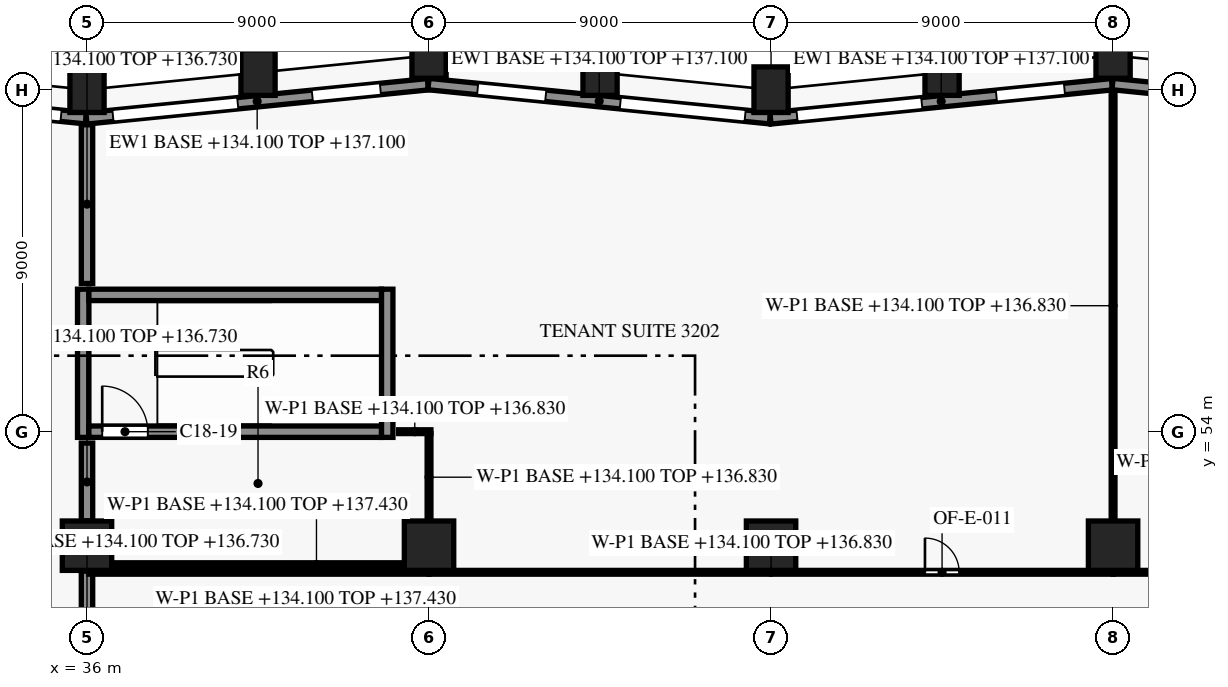
"""IFC4 building model, lengths in metres.
Left out: names, types, materials, properties, quantities, classifications, styles, units other than length and angle.
Written with IfcOpenShell. Run it as: python <this file> out.ifc"""

import sys

from ifc_helpers import new_model, si_unit, direction, frame, frame_2d, origin, origin_2d, place, context, subcontext, project, spatial, rectangle, extrude, element, fill, save


model = new_model("IFC4")
c1 = context("Model", 3, precision=1e-05, world=origin(), true_north=direction((0.0, 1.0)))
c2 = subcontext(c1, "Body", "Model", "MODEL_VIEW")
j1 = project(units=[si_unit("LENGTHUNIT", "METRE"), si_unit("PLANEANGLEUNIT", "RADIAN")], contexts=[c1])
p1 = place(None, origin())
s1 = spatial("IfcSite", under=j1, at=p1, CompositionType="ELEMENT")
p2 = place(p1, origin())
s2 = spatial("IfcBuilding", under=s1, at=p2, CompositionType="ELEMENT")
p3 = place(p2, frame((0.0, 0.0, 134.1)))
s3 = spatial("IfcBuildingStorey", under=s2, at=p3, CompositionType="ELEMENT", Elevation=134.1)
for number, where, z_axis, x_axis in (
    (1, (63.0, 63.9, 0.0), (0.0, 0.0, 1.0), (-1.0, 0.0, 0.0)),
    (2, (58.5, 63.45, 0.0), (0.0, 0.0, 1.0), (-0.995, -0.1, 0.0)),
    (3, (54.0, 63.0, 0.0), (0.0, 0.0, 1.0), (-1.0, 0.0, 0.0)),
    (4, (49.5, 63.45, 0.0), (0.0, 0.0, 1.0), (-0.995, 0.1, 0.0)),
    (5, (45.0, 63.9, 0.0), (0.0, 0.0, 1.0), (-1.0, 0.0, 0.0)),
    (6, (40.5, 63.45, 0.0), (0.0, 0.0, 1.0), (-0.995, -0.1, 0.0)),
    (7, (36.0, 63.0, 0.0), (0.0, 0.0, 1.0), (-1.0, 0.0, 0.0)),
):
    element("IfcColumn", number, at=place(p3, frame(where, z_axis=z_axis, x_axis=x_axis)), inside=s3, PredefinedType="COLUMN", context=c2, shape_type="SweptSolid", body=[
        extrude(rectangle(XDim=0.9, YDim=1.2, at=origin_2d()), origin(), (0.0, 0.0, 1.0), 3.8),
    ])
for number, where, z_axis, x_axis in (
    (8, (36.0, 51.0, 0.0), (0.0, 0.0, 1.0), (1.0, 0.0, 0.0)),
    (9, (45.0, 51.0, 0.0), (0.0, 0.0, 1.0), (1.0, 0.0, 0.0)),
    (10, (54.0, 51.0, 0.0), (0.0, 0.0, 1.0), (1.0, 0.0, 0.0)),
    (11, (63.0, 51.0, 0.0), (0.0, 0.0, 1.0), (1.0, 0.0, 0.0)),
):
    element("IfcColumn", number, at=place(p3, frame(where, z_axis=z_axis, x_axis=x_axis)), inside=s3, PredefinedType="COLUMN", context=c2, shape_type="SweptSolid", body=[
        extrude(rectangle(XDim=1.3, YDim=1.3, at=origin_2d()), origin(), (0.0, 0.0, 1.0), 3.8),
    ])
p4 = place(p3, frame((62.985, 63.148, 0.0), z_axis=(0.0, 0.0, 1.0), x_axis=(0.995038521274, -0.099490407478, 0.0)))
e12 = element("IfcWall", 12, at=p4, inside=s3, PredefinedType="SOLIDWALL", context=c2, shape_type="SweptSolid", body=[
    extrude(rectangle(XDim=3.632, YDim=0.3, at=frame_2d((1.816, 0.0))), origin(), (0.0, 0.0, 1.0), 3.0),
])
p5 = place(p4, frame((1.301, 0.0, 0.75)))
e13 = element("IfcOpeningElement", 13, at=p5, cuts=e12, PredefinedType="OPENING", context=c2, shape_type="SweptSolid", body=[
    extrude(rectangle(XDim=1.8, YDim=1.8, at=frame_2d((0.9, 0.9))), frame((0.0, 0.16, 0.0), z_axis=(0.0, -1.0, 0.0), x_axis=(1.0, 0.0, 0.0)), (0.0, 0.0, 1.0), 0.32),
])
p6 = place(p3, frame((53.985, 62.245, 0.0), z_axis=(0.0, 0.0, 1.0), x_axis=(0.995037993253, 0.099495688264, 0.0)))
e14 = element("IfcWall", 14, at=p6, inside=s3, PredefinedType="SOLIDWALL", context=c2, shape_type="SweptSolid", body=[
    extrude(rectangle(XDim=9.03, YDim=0.3, at=frame_2d((4.515, 0.0))), origin(), (0.0, 0.0, 1.0), 3.0),
])
p7 = place(p6, frame((0.701, 0.0, 0.15)))
e15 = element("IfcOpeningElement", 15, at=p7, cuts=e14, PredefinedType="OPENING", context=c2, shape_type="SweptSolid", body=[
    extrude(rectangle(XDim=3.3, YDim=2.4, at=frame_2d((1.65, 1.2))), frame((0.0, 0.16, 0.0), z_axis=(0.0, -1.0, 0.0), x_axis=(1.0, 0.0, 0.0)), (0.0, 0.0, 1.0), 0.32),
])
p8 = place(p6, frame((5.974, 0.0, 0.75)))
e16 = element("IfcOpeningElement", 16, at=p8, cuts=e14, PredefinedType="OPENING", context=c2, shape_type="SweptSolid", body=[
    extrude(rectangle(XDim=1.8, YDim=1.8, at=frame_2d((0.9, 0.9))), frame((0.0, 0.16, 0.0), z_axis=(0.0, -1.0, 0.0), x_axis=(1.0, 0.0, 0.0)), (0.0, 0.0, 1.0), 0.32),
])
p9 = place(p3, frame((44.985, 63.148, 0.0), z_axis=(0.0, 0.0, 1.0), x_axis=(0.995037993253, -0.099495688264, 0.0)))
e17 = element("IfcWall", 17, at=p9, inside=s3, PredefinedType="SOLIDWALL", context=c2, shape_type="SweptSolid", body=[
    extrude(rectangle(XDim=9.03, YDim=0.3, at=frame_2d((4.515, 0.0))), origin(), (0.0, 0.0, 1.0), 3.0),
])
p10 = place(p9, frame((1.301, 0.0, 0.75)))
e18 = element("IfcOpeningElement", 18, at=p10, cuts=e17, PredefinedType="OPENING", context=c2, shape_type="SweptSolid", body=[
    extrude(rectangle(XDim=1.8, YDim=1.8, at=frame_2d((0.9, 0.9))), frame((0.0, 0.16, 0.0), z_axis=(0.0, -1.0, 0.0), x_axis=(1.0, 0.0, 0.0)), (0.0, 0.0, 1.0), 0.32),
])
p11 = place(p9, frame((5.073, 0.0, 0.15)))
e19 = element("IfcOpeningElement", 19, at=p11, cuts=e17, PredefinedType="OPENING", context=c2, shape_type="SweptSolid", body=[
    extrude(rectangle(XDim=3.3, YDim=2.4, at=frame_2d((1.65, 1.2))), frame((0.0, 0.16, 0.0), z_axis=(0.0, -1.0, 0.0), x_axis=(1.0, 0.0, 0.0)), (0.0, 0.0, 1.0), 0.32),
])
p12 = place(p3, frame((35.985, 62.245, 0.0), z_axis=(0.0, 0.0, 1.0), x_axis=(0.995037993253, 0.099495688264, 0.0)))
e20 = element("IfcWall", 20, at=p12, inside=s3, PredefinedType="SOLIDWALL", context=c2, shape_type="SweptSolid", body=[
    extrude(rectangle(XDim=9.03, YDim=0.3, at=frame_2d((4.515, 0.0))), origin(), (0.0, 0.0, 1.0), 3.0),
])
p13 = place(p12, frame((0.701, 0.0, 0.15)))
e21 = element("IfcOpeningElement", 21, at=p13, cuts=e20, PredefinedType="OPENING", context=c2, shape_type="SweptSolid", body=[
    extrude(rectangle(XDim=3.3, YDim=2.4, at=frame_2d((1.65, 1.2))), frame((0.0, 0.16, 0.0), z_axis=(0.0, -1.0, 0.0), x_axis=(1.0, 0.0, 0.0)), (0.0, 0.0, 1.0), 0.32),
])
p14 = place(p12, frame((5.974, 0.0, 0.75)))
e22 = element("IfcOpeningElement", 22, at=p14, cuts=e20, PredefinedType="OPENING", context=c2, shape_type="SweptSolid", body=[
    extrude(rectangle(XDim=1.8, YDim=1.8, at=frame_2d((0.9, 0.9))), frame((0.0, 0.16, 0.0), z_axis=(0.0, -1.0, 0.0), x_axis=(1.0, 0.0, 0.0)), (0.0, 0.0, 1.0), 0.32),
])
p15 = place(p3, frame((27.075, 63.139, 0.0), z_axis=(0.0, 0.0, 1.0), x_axis=(0.995036108601, -0.099514534519, 0.0)))
e23 = element("IfcWall", 23, at=p15, inside=s3, PredefinedType="SOLIDWALL", context=c2, shape_type="SweptSolid", body=[
    extrude(rectangle(XDim=8.94, YDim=0.3, at=frame_2d((4.47, 0.0))), origin(), (0.0, 0.0, 1.0), 3.0),
])
p16 = place(p15, frame((1.211, 0.0, 0.75)))
e24 = element("IfcOpeningElement", 24, at=p16, cuts=e23, PredefinedType="OPENING", context=c2, shape_type="SweptSolid", body=[
    extrude(rectangle(XDim=1.8, YDim=1.8, at=frame_2d((0.9, 0.9))), frame((0.0, 0.16, 0.0), z_axis=(0.0, -1.0, 0.0), x_axis=(1.0, 0.0, 0.0)), (0.0, 0.0, 1.0), 0.32),
])
p17 = place(p15, frame((4.984, 0.0, 0.15)))
e25 = element("IfcOpeningElement", 25, at=p17, cuts=e23, PredefinedType="OPENING", context=c2, shape_type="SweptSolid", body=[
    extrude(rectangle(XDim=3.3, YDim=2.4, at=frame_2d((1.65, 1.2))), frame((0.0, 0.16, 0.0), z_axis=(0.0, -1.0, 0.0), x_axis=(1.0, 0.0, 0.0)), (0.0, 0.0, 1.0), 0.32),
])
p18 = place(p3, frame((36.05, 54.0, 0.0), z_axis=(0.0, 0.0, 1.0), x_axis=(1.0, 0.0, 0.0)))
e26 = element("IfcWall", 26, at=p18, inside=s3, PredefinedType="SHEAR", context=c2, shape_type="SweptSolid", body=[
    extrude(rectangle(XDim=7.7, YDim=0.3, at=frame_2d((3.85, 0.0))), origin(), (0.0, 0.0, 1.0), 3.5),
])
p19 = place(p18, frame((0.35, 0.0, 0.0)))
e27 = element("IfcOpeningElement", 27, at=p19, cuts=e26, PredefinedType="OPENING", context=c2, shape_type="SweptSolid", body=[
    extrude(rectangle(XDim=1.2, YDim=2.2, at=frame_2d((0.6, 1.1))), frame((0.0, 0.16, 0.0), z_axis=(0.0, -1.0, 0.0), x_axis=(1.0, 0.0, 0.0)), (0.0, 0.0, 1.0), 0.32),
])
p20 = place(p3, frame((36.05, 57.6, 0.0), z_axis=(0.0, 0.0, 1.0), x_axis=(1.0, 0.0, 0.0)))
e28 = element("IfcWall", 28, at=p20, inside=s3, PredefinedType="SHEAR", context=c2, shape_type="SweptSolid", body=[
    extrude(rectangle(XDim=7.7, YDim=0.3, at=frame_2d((3.85, 0.0))), origin(), (0.0, 0.0, 1.0), 3.5),
])
for number, where, z_axis, x_axis in (
    (29, (35.9, 53.85, 0.0), (0.0, 0.0, 1.0), (0.0, 1.0, 0.0)),
    (30, (43.9, 53.85, 0.0), (0.0, 0.0, 1.0), (0.0, 1.0, 0.0)),
):
    element("IfcWall", number, at=place(p3, frame(where, z_axis=z_axis, x_axis=x_axis)), inside=s3, PredefinedType="SHEAR", context=c2, shape_type="SweptSolid", body=[
        extrude(rectangle(XDim=3.9, YDim=0.3, at=frame_2d((1.95, 0.0))), origin(), (0.0, 0.0, 1.0), 3.5),
    ])
p21 = place(p3, frame((36.0, 48.05, 0.0), z_axis=(0.0, 0.0, 1.0), x_axis=(0.0, 1.0, 0.0)))
e31 = element("IfcWall", 31, at=p21, inside=s3, PredefinedType="PARTITIONING", context=c2, shape_type="SweptSolid", body=[
    extrude(rectangle(XDim=2.28, YDim=0.3, at=frame_2d((1.14, 0.0))), origin(), (0.0, 0.0, 1.0), 2.63),
])
p22 = place(p3, frame((36.05, 50.3, 0.0), z_axis=(0.0, 0.0, 1.0), x_axis=(1.0, 0.0, 0.0)))
e32 = element("IfcWall", 32, at=p22, inside=s3, PredefinedType="PARTITIONING", context=c2, shape_type="SweptSolid", body=[
    extrude(rectangle(XDim=8.95, YDim=0.1, at=frame_2d((4.475, 0.0))), origin(), (0.0, 0.0, 1.0), 2.63),
])
p23 = place(p3, frame((45.0, 50.3, 0.0), z_axis=(0.0, 0.0, 1.0), x_axis=(1.0, 0.0, 0.0)))
e33 = element("IfcWall", 33, at=p23, inside=s3, PredefinedType="PARTITIONING", context=c2, shape_type="SweptSolid", body=[
    extrude(rectangle(XDim=18.0, YDim=0.1, at=frame_2d((9.0, 0.0))), origin(), (0.0, 0.0, 1.0), 2.73),
])
p24 = place(p23, frame((13.05, 0.0, 0.0)))
e34 = element("IfcOpeningElement", 34, at=p24, cuts=e33, PredefinedType="OPENING", context=c2, shape_type="SweptSolid", body=[
    extrude(rectangle(XDim=0.9, YDim=2.1, at=frame_2d((0.45, 1.05))), frame((0.0, 0.06, 0.0), z_axis=(0.0, -1.0, 0.0), x_axis=(1.0, 0.0, 0.0)), (0.0, 0.0, 1.0), 0.12),
])
p25 = place(p3, frame((63.0, 50.3, 0.0), z_axis=(0.0, 0.0, 1.0), x_axis=(1.0, 0.0, 0.0)))
e35 = element("IfcWall", 35, at=p25, inside=s3, PredefinedType="PARTITIONING", context=c2, shape_type="SweptSolid", body=[
    extrude(rectangle(XDim=8.08, YDim=0.1, at=frame_2d((4.04, 0.0))), origin(), (0.0, 0.0, 1.0), 2.73),
])
p26 = place(p25, frame((3.174, 0.0, 0.0)))
e36 = element("IfcOpeningElement", 36, at=p26, cuts=e35, PredefinedType="OPENING", context=c2, shape_type="SweptSolid", body=[
    extrude(rectangle(XDim=1.8, YDim=2.1, at=frame_2d((0.9, 1.05))), frame((0.0, 0.06, 0.0), z_axis=(0.0, -1.0, 0.0), x_axis=(1.0, 0.0, 0.0)), (0.0, 0.0, 1.0), 0.12),
])
p27 = place(p3, frame((44.345, 50.5, 0.0), z_axis=(0.0, 0.0, 1.0), x_axis=(-1.0, 0.0, 0.0)))
e37 = element("IfcWall", 37, at=p27, inside=s3, PredefinedType="PARTITIONING", context=c2, shape_type="SweptSolid", body=[
    extrude(rectangle(XDim=7.69, YDim=0.1, at=frame_2d((3.845, 0.0))), origin(), (0.0, 0.0, 1.0), 3.33),
])
p28 = place(p3, frame((36.0, 51.655, 0.0), z_axis=(0.0, 0.0, 1.0), x_axis=(0.0, 1.0, 0.0)))
e38 = element("IfcWall", 38, at=p28, inside=s3, PredefinedType="PARTITIONING", context=c2, shape_type="SweptSolid", body=[
    extrude(rectangle(XDim=2.045, YDim=0.3, at=frame_2d((1.022, 0.0))), origin(), (0.0, 0.0, 1.0), 2.63),
])
p29 = place(p3, frame((45.0, 53.95, 0.0), z_axis=(0.0, 0.0, 1.0), x_axis=(0.0, -1.0, 0.0)))
e39 = element("IfcWall", 39, at=p29, inside=s3, PredefinedType="PARTITIONING", context=c2, shape_type="SweptSolid", body=[
    extrude(rectangle(XDim=2.295, YDim=0.1, at=frame_2d((1.147, 0.0))), origin(), (0.0, 0.0, 1.0), 2.73),
])
p30 = place(p3, frame((44.2, 54.0, 0.0), z_axis=(0.0, 0.0, 1.0), x_axis=(1.0, 0.0, 0.0)))
e40 = element("IfcWall", 40, at=p30, inside=s3, PredefinedType="PARTITIONING", context=c2, shape_type="SweptSolid", body=[
    extrude(rectangle(XDim=0.85, YDim=0.1, at=frame_2d((0.425, 0.0))), origin(), (0.0, 0.0, 1.0), 2.73),
])
p31 = place(p3, frame((36.0, 57.9, 0.0), z_axis=(0.0, 0.0, 1.0), x_axis=(0.0, 1.0, 0.0)))
e41 = element("IfcWall", 41, at=p31, inside=s3, PredefinedType="PARTITIONING", context=c2, shape_type="SweptSolid", body=[
    extrude(rectangle(XDim=4.176, YDim=0.3, at=frame_2d((2.088, 0.0))), origin(), (0.0, 0.0, 1.0), 2.63),
])
p32 = place(p3, frame((63.0, 62.976, 0.0), z_axis=(0.0, 0.0, 1.0), x_axis=(0.0, -1.0, 0.0)))
e42 = element("IfcWall", 42, at=p32, inside=s3, PredefinedType="PARTITIONING", context=c2, shape_type="SweptSolid", body=[
    extrude(rectangle(XDim=11.321, YDim=0.1, at=frame_2d((5.66, 0.0))), origin(), (0.0, 0.0, 1.0), 2.73),
])
p33 = place(p7, origin())
e43 = element("IfcWindow", 43, at=p33, inside=s3, PartitioningType="SINGLE_PANEL", PredefinedType="WINDOW", context=c2, shape_type="SweptSolid", body=[
    extrude(rectangle(XDim=3.3, YDim=2.4, at=frame_2d((1.65, 1.2))), frame((0.0, 0.03, 0.0), z_axis=(0.0, -1.0, 0.0), x_axis=(1.0, 0.0, 0.0)), (0.0, 0.0, 1.0), 0.06),
])
fill(e15, e43)
p34 = place(p8, origin())
e44 = element("IfcWindow", 44, at=p34, inside=s3, PartitioningType="SINGLE_PANEL", PredefinedType="WINDOW", context=c2, shape_type="SweptSolid", body=[
    extrude(rectangle(XDim=1.8, YDim=1.8, at=frame_2d((0.9, 0.9))), frame((0.0, 0.03, 0.0), z_axis=(0.0, -1.0, 0.0), x_axis=(1.0, 0.0, 0.0)), (0.0, 0.0, 1.0), 0.06),
])
fill(e16, e44)
p35 = place(p10, origin())
e45 = element("IfcWindow", 45, at=p35, inside=s3, PartitioningType="SINGLE_PANEL", PredefinedType="WINDOW", context=c2, shape_type="SweptSolid", body=[
    extrude(rectangle(XDim=1.8, YDim=1.8, at=frame_2d((0.9, 0.9))), frame((0.0, 0.03, 0.0), z_axis=(0.0, -1.0, 0.0), x_axis=(1.0, 0.0, 0.0)), (0.0, 0.0, 1.0), 0.06),
])
fill(e18, e45)
p36 = place(p11, origin())
e46 = element("IfcWindow", 46, at=p36, inside=s3, PartitioningType="SINGLE_PANEL", PredefinedType="WINDOW", context=c2, shape_type="SweptSolid", body=[
    extrude(rectangle(XDim=3.3, YDim=2.4, at=frame_2d((1.65, 1.2))), frame((0.0, 0.03, 0.0), z_axis=(0.0, -1.0, 0.0), x_axis=(1.0, 0.0, 0.0)), (0.0, 0.0, 1.0), 0.06),
])
fill(e19, e46)
p37 = place(p13, origin())
e47 = element("IfcWindow", 47, at=p37, inside=s3, PartitioningType="SINGLE_PANEL", PredefinedType="WINDOW", context=c2, shape_type="SweptSolid", body=[
    extrude(rectangle(XDim=3.3, YDim=2.4, at=frame_2d((1.65, 1.2))), frame((0.0, 0.03, 0.0), z_axis=(0.0, -1.0, 0.0), x_axis=(1.0, 0.0, 0.0)), (0.0, 0.0, 1.0), 0.06),
])
fill(e21, e47)
p38 = place(p14, origin())
e48 = element("IfcWindow", 48, at=p38, inside=s3, PartitioningType="SINGLE_PANEL", PredefinedType="WINDOW", context=c2, shape_type="SweptSolid", body=[
    extrude(rectangle(XDim=1.8, YDim=1.8, at=frame_2d((0.9, 0.9))), frame((0.0, 0.03, 0.0), z_axis=(0.0, -1.0, 0.0), x_axis=(1.0, 0.0, 0.0)), (0.0, 0.0, 1.0), 0.06),
])
fill(e22, e48)
p39 = place(p17, origin())
e49 = element("IfcWindow", 49, at=p39, inside=s3, PartitioningType="SINGLE_PANEL", PredefinedType="WINDOW", context=c2, shape_type="SweptSolid", body=[
    extrude(rectangle(XDim=3.3, YDim=2.4, at=frame_2d((1.65, 1.2))), frame((0.0, 0.03, 0.0), z_axis=(0.0, -1.0, 0.0), x_axis=(1.0, 0.0, 0.0)), (0.0, 0.0, 1.0), 0.06),
])
fill(e25, e49)
p40 = place(p19, origin())
e50 = element("IfcDoor", 50, at=p40, inside=s3, OperationType="SINGLE_SWING_LEFT", PredefinedType="DOOR", context=c2, shape_type="SweptSolid", body=[
    extrude(rectangle(XDim=1.2, YDim=2.2, at=frame_2d((0.6, 1.1))), frame((0.0, 0.025, 0.0), z_axis=(0.0, -1.0, 0.0), x_axis=(1.0, 0.0, 0.0)), (0.0, 0.0, 1.0), 0.05),
])
fill(e27, e50)
p41 = place(p24, origin())
e51 = element("IfcDoor", 51, at=p41, inside=s3, OperationType="SINGLE_SWING_LEFT", PredefinedType="DOOR", context=c2, shape_type="SweptSolid", body=[
    extrude(rectangle(XDim=0.9, YDim=2.1, at=frame_2d((0.45, 1.05))), frame((0.0, 0.025, 0.0), z_axis=(0.0, -1.0, 0.0), x_axis=(1.0, 0.0, 0.0)), (0.0, 0.0, 1.0), 0.05),
])
fill(e34, e51)
save(model, sys.argv[1])
